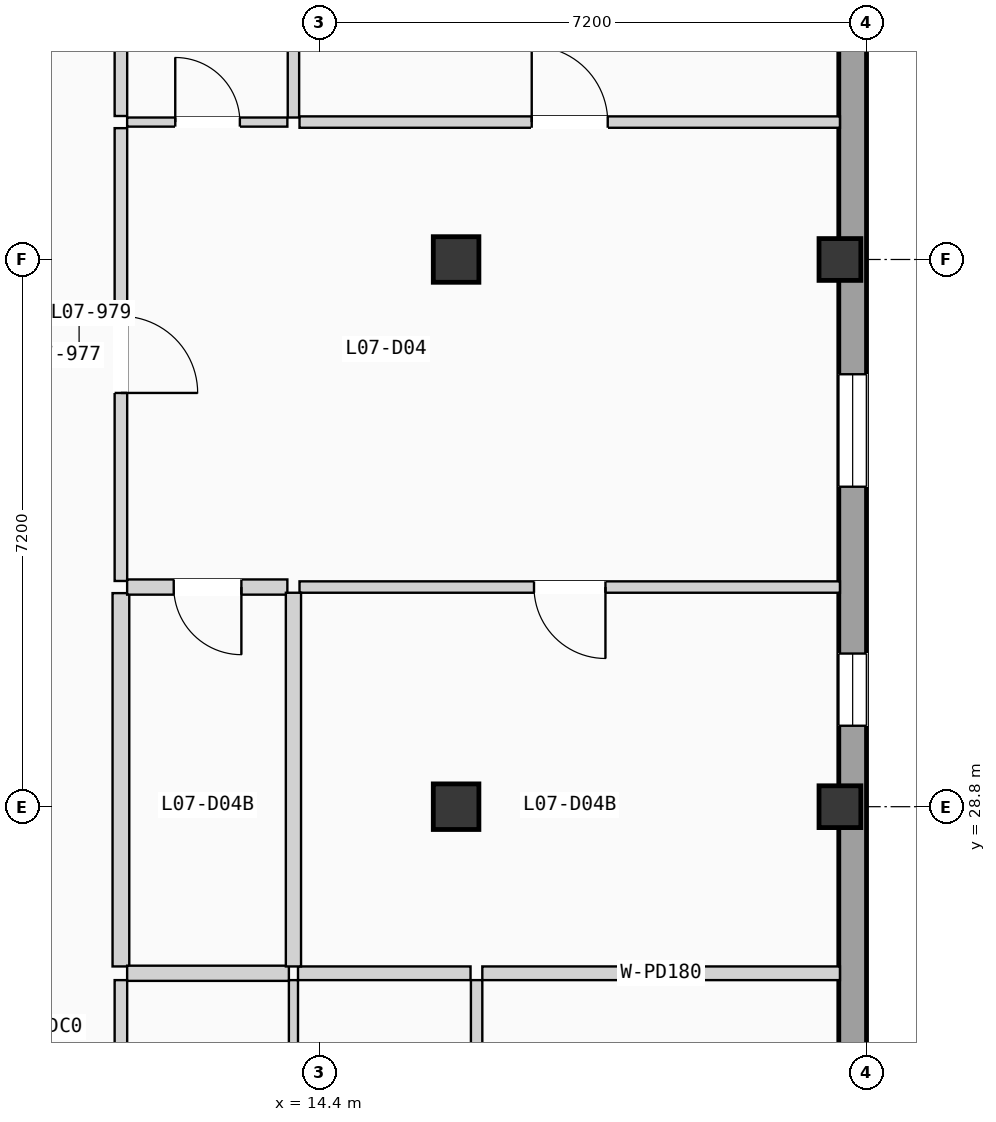
"""IFC4 building model, lengths in metres.
Left out: names, types, materials, properties, quantities, classifications, styles, units other than length and angle.
Written with IfcOpenShell. Run it as: python <this file> out.ifc"""

import sys

from ifc_helpers import new_model, si_unit, direction, frame, frame_2d, origin, origin_2d, place, context, subcontext, project, spatial, rectangle, extrude, element, fill, save


model = new_model("IFC4")
c1 = context("Model", 3, precision=1e-05, world=origin(), true_north=direction((0.0, 1.0)))
c2 = subcontext(c1, "Body", "Model", "MODEL_VIEW")
j1 = project(units=[si_unit("LENGTHUNIT", "METRE"), si_unit("PLANEANGLEUNIT", "RADIAN")], contexts=[c1])
p1 = place(None, origin())
s1 = spatial("IfcSite", under=j1, at=p1, CompositionType="ELEMENT")
p2 = place(p1, origin())
s2 = spatial("IfcBuilding", under=s1, at=p2, CompositionType="ELEMENT")
p3 = place(p2, frame((0.0, 0.0, 24.675)))
s3 = spatial("IfcBuildingStorey", under=s2, at=p3, CompositionType="ELEMENT", Elevation=24.675)
for number, where, z_axis, x_axis in (
    (1, (16.2, 28.8, 0.0), (0.0, 0.0, 1.0), (1.0, 0.0, 0.0)),
    (2, (16.2, 36.0, 0.0), (0.0, 0.0, 1.0), (1.0, 0.0, 0.0)),
):
    element("IfcColumn", number, at=place(p3, frame(where, z_axis=z_axis, x_axis=x_axis)), inside=s3, PredefinedType="COLUMN", context=c2, shape_type="SweptSolid", body=[
        extrude(rectangle(XDim=0.6, YDim=0.6, at=origin_2d()), origin(), (0.0, 0.0, 1.0), 3.15),
    ])
for number, where, z_axis, x_axis in (
    (3, (21.25, 28.8, 0.0), (0.0, 0.0, 1.0), (1.0, 0.0, 0.0)),
    (4, (21.25, 36.0, 0.0), (0.0, 0.0, 1.0), (1.0, 0.0, 0.0)),
):
    element("IfcColumn", number, at=place(p3, frame(where, z_axis=z_axis, x_axis=x_axis)), inside=s3, PredefinedType="COLUMN", context=c2, shape_type="SweptSolid", body=[
        extrude(rectangle(XDim=0.55, YDim=0.55, at=origin_2d()), origin(), (0.0, 0.0, 1.0), 3.15),
    ])
p4 = place(p3, frame((21.417, 0.365, 0.0), z_axis=(0.0, 0.0, 1.0), x_axis=(0.0, 1.0, 0.0)))
e5 = element("IfcWall", 5, at=p4, inside=s3, PredefinedType="SOLIDWALL", context=c2, shape_type="SweptSolid", body=[
    extrude(rectangle(XDim=49.67, YDim=0.365, at=frame_2d((24.835, 0.0))), origin(), (0.0, 0.0, 1.0), 2.6),
])
p5 = place(p4, frame((16.517, 0.0, 0.9)))
e6 = element("IfcOpeningElement", 6, at=p5, cuts=e5, PredefinedType="OPENING", context=c2, shape_type="SweptSolid", body=[
    extrude(rectangle(XDim=1.48, YDim=1.2, at=frame_2d((0.74, 0.6))), frame((0.0, 0.192, 0.0), z_axis=(0.0, -1.0, 0.0), x_axis=(1.0, 0.0, 0.0)), (0.0, 0.0, 1.0), 0.385),
])
p6 = place(p4, frame((9.387, 0.0, 0.815)))
e7 = element("IfcOpeningElement", 7, at=p6, cuts=e5, PredefinedType="OPENING", context=c2, shape_type="SweptSolid", body=[
    extrude(rectangle(XDim=1.48, YDim=1.35, at=frame_2d((0.74, 0.675))), frame((0.0, 0.192, 0.0), z_axis=(0.0, -1.0, 0.0), x_axis=(1.0, 0.0, 0.0)), (0.0, 0.0, 1.0), 0.385),
])
p7 = place(p4, frame((23.089, 0.0, 0.665)))
e8 = element("IfcOpeningElement", 8, at=p7, cuts=e5, PredefinedType="OPENING", context=c2, shape_type="SweptSolid", body=[
    extrude(rectangle(XDim=1.48, YDim=1.5, at=frame_2d((0.74, 0.75))), frame((0.0, 0.192, 0.0), z_axis=(0.0, -1.0, 0.0), x_axis=(1.0, 0.0, 0.0)), (0.0, 0.0, 1.0), 0.385),
])
p8 = place(p4, frame((32.645, 0.0, 0.515)))
e9 = element("IfcOpeningElement", 9, at=p8, cuts=e5, PredefinedType="OPENING", context=c2, shape_type="SweptSolid", body=[
    extrude(rectangle(XDim=1.48, YDim=1.65, at=frame_2d((0.74, 0.825))), frame((0.0, 0.192, 0.0), z_axis=(0.0, -1.0, 0.0), x_axis=(1.0, 0.0, 0.0)), (0.0, 0.0, 1.0), 0.385),
])
p9 = place(p4, frame((29.5, 0.0, 0.85)))
e10 = element("IfcOpeningElement", 10, at=p9, cuts=e5, PredefinedType="OPENING", context=c2, shape_type="SweptSolid", body=[
    extrude(rectangle(XDim=0.95, YDim=1.2, at=frame_2d((0.475, 0.6))), frame((0.0, 0.192, 0.0), z_axis=(0.0, -1.0, 0.0), x_axis=(1.0, 0.0, 0.0)), (0.0, 0.0, 1.0), 0.385),
])
p10 = place(p4, frame((39.179, 0.0, 0.9)))
e11 = element("IfcOpeningElement", 11, at=p10, cuts=e5, PredefinedType="OPENING", context=c2, shape_type="SweptSolid", body=[
    extrude(rectangle(XDim=1.6, YDim=1.2, at=frame_2d((0.8, 0.6))), frame((0.0, 0.192, 0.0), z_axis=(0.0, -1.0, 0.0), x_axis=(1.0, 0.0, 0.0)), (0.0, 0.0, 1.0), 0.385),
])
p11 = place(p3, frame((11.79, 20.733, 0.0), z_axis=(0.0, 0.0, 1.0), x_axis=(0.0, 1.0, 0.0)))
e12 = element("IfcWall", 12, at=p11, inside=s3, PredefinedType="PARTITIONING", context=c2, shape_type="SweptSolid", body=[
    extrude(rectangle(XDim=5.785, YDim=0.165, at=frame_2d((2.893, 0.0))), origin(), (0.0, 0.0, 1.0), 2.87),
])
p12 = place(p3, frame((11.79, 31.77, 0.0), z_axis=(0.0, 0.0, 1.0), x_axis=(0.0, 1.0, 0.0)))
e13 = element("IfcWall", 13, at=p12, inside=s3, PredefinedType="PARTITIONING", context=c2, shape_type="SweptSolid", body=[
    extrude(rectangle(XDim=5.958, YDim=0.165, at=frame_2d((2.979, 0.0))), origin(), (0.0, 0.0, 1.0), 2.87),
])
p13 = place(p12, frame((2.474, 0.0, 0.0)))
e14 = element("IfcOpeningElement", 14, at=p13, cuts=e13, PredefinedType="OPENING", context=c2, shape_type="SweptSolid", body=[
    extrude(rectangle(XDim=1.01, YDim=2.11, at=frame_2d((0.505, 1.055))), frame((0.0, 0.093, 0.0), z_axis=(0.0, -1.0, 0.0), x_axis=(1.0, 0.0, 0.0)), (0.0, 0.0, 1.0), 0.185),
])
p14 = place(p3, frame((11.79, 26.698, 0.0), z_axis=(0.0, 0.0, 1.0), x_axis=(0.0, 1.0, 0.0)))
e15 = element("IfcWall", 15, at=p14, inside=s3, PredefinedType="PLUMBINGWALL", context=c2, shape_type="SweptSolid", body=[
    extrude(rectangle(XDim=4.912, YDim=0.22, at=frame_2d((2.456, 0.0))), origin(), (0.0, 0.0, 1.0), 2.87),
])
p15 = place(p3, frame((11.79, 37.888, 0.0), z_axis=(0.0, 0.0, 1.0), x_axis=(0.0, 1.0, 0.0)))
e16 = element("IfcWall", 16, at=p15, inside=s3, PredefinedType="PARTITIONING", context=c2, shape_type="SweptSolid", body=[
    extrude(rectangle(XDim=4.912, YDim=0.165, at=frame_2d((2.456, 0.0))), origin(), (0.0, 0.0, 1.0), 2.87),
])
p16 = place(p3, frame((14.06, 20.713, 0.0), z_axis=(0.0, 0.0, 1.0), x_axis=(0.0, 1.0, 0.0)))
e17 = element("IfcWall", 17, at=p16, inside=s3, PredefinedType="PARTITIONING", context=c2, shape_type="SweptSolid", body=[
    extrude(rectangle(XDim=5.805, YDim=0.12, at=frame_2d((2.903, 0.0))), origin(), (0.0, 0.0, 1.0), 2.87),
])
p17 = place(p3, frame((11.872, 26.608, 0.0), z_axis=(0.0, 0.0, 1.0), x_axis=(1.0, 0.0, 0.0)))
e18 = element("IfcWall", 18, at=p17, inside=s3, PredefinedType="PLUMBINGWALL", context=c2, shape_type="SweptSolid", body=[
    extrude(rectangle(XDim=2.128, YDim=0.2, at=frame_2d((1.064, 0.0))), origin(), (0.0, 0.0, 1.0), 2.87),
])
p18 = place(p3, frame((16.47, 20.728, 0.0), z_axis=(0.0, 0.0, 1.0), x_axis=(0.0, 1.0, 0.0)))
e19 = element("IfcWall", 19, at=p18, inside=s3, PredefinedType="PARTITIONING", context=c2, shape_type="SweptSolid", body=[
    extrude(rectangle(XDim=5.79, YDim=0.15, at=frame_2d((2.895, 0.0))), origin(), (0.0, 0.0, 1.0), 2.87),
])
p19 = place(p3, frame((16.545, 26.608, 0.0), z_axis=(0.0, 0.0, 1.0), x_axis=(1.0, 0.0, 0.0)))
e20 = element("IfcWall", 20, at=p19, inside=s3, PredefinedType="PARTITIONING", context=c2, shape_type="SweptSolid", body=[
    extrude(rectangle(XDim=4.705, YDim=0.18, at=frame_2d((2.353, 0.0))), origin(), (0.0, 0.0, 1.0), 2.87),
])
p20 = place(p3, frame((14.12, 26.608, 0.0), z_axis=(0.0, 0.0, 1.0), x_axis=(1.0, 0.0, 0.0)))
e21 = element("IfcWall", 21, at=p20, inside=s3, PredefinedType="PARTITIONING", context=c2, shape_type="SweptSolid", body=[
    extrude(rectangle(XDim=2.27, YDim=0.18, at=frame_2d((1.135, 0.0))), origin(), (0.0, 0.0, 1.0), 2.87),
])
p21 = place(p3, frame((11.872, 31.69, 0.0), z_axis=(0.0, 0.0, 1.0), x_axis=(1.0, 0.0, 0.0)))
e22 = element("IfcWall", 22, at=p21, inside=s3, PredefinedType="PLUMBINGWALL", context=c2, shape_type="SweptSolid", body=[
    extrude(rectangle(XDim=2.108, YDim=0.2, at=frame_2d((1.054, 0.0))), origin(), (0.0, 0.0, 1.0), 2.87),
])
p22 = place(p21, frame((0.613, 0.0, 0.0)))
e23 = element("IfcOpeningElement", 23, at=p22, cuts=e22, PredefinedType="OPENING", context=c2, shape_type="SweptSolid", body=[
    extrude(rectangle(XDim=0.89, YDim=2.03, at=frame_2d((0.445, 1.015))), frame((0.0, 0.11, 0.0), z_axis=(0.0, -1.0, 0.0), x_axis=(1.0, 0.0, 0.0)), (0.0, 0.0, 1.0), 0.22),
])
p23 = place(p3, frame((11.872, 37.808, 0.0), z_axis=(0.0, 0.0, 1.0), x_axis=(1.0, 0.0, 0.0)))
e24 = element("IfcWall", 24, at=p23, inside=s3, PredefinedType="PARTITIONING", context=c2, shape_type="SweptSolid", body=[
    extrude(rectangle(XDim=2.108, YDim=0.12, at=frame_2d((1.054, 0.0))), origin(), (0.0, 0.0, 1.0), 2.87),
])
p24 = place(p23, frame((0.633, 0.0, 0.0)))
e25 = element("IfcOpeningElement", 25, at=p24, cuts=e24, PredefinedType="OPENING", context=c2, shape_type="SweptSolid", body=[
    extrude(rectangle(XDim=0.85, YDim=2.01, at=frame_2d((0.425, 1.005))), frame((0.0, 0.07, 0.0), z_axis=(0.0, -1.0, 0.0), x_axis=(1.0, 0.0, 0.0)), (0.0, 0.0, 1.0), 0.14),
])
p25 = place(p3, frame((14.14, 31.69, 0.0), z_axis=(0.0, 0.0, 1.0), x_axis=(1.0, 0.0, 0.0)))
e26 = element("IfcWall", 26, at=p25, inside=s3, PredefinedType="PARTITIONING", context=c2, shape_type="SweptSolid", body=[
    extrude(rectangle(XDim=7.11, YDim=0.15, at=frame_2d((3.555, 0.0))), origin(), (0.0, 0.0, 1.0), 2.87),
])
p26 = place(p25, frame((3.085, 0.0, 0.0)))
e27 = element("IfcOpeningElement", 27, at=p26, cuts=e26, PredefinedType="OPENING", context=c2, shape_type="SweptSolid", body=[
    extrude(rectangle(XDim=0.94, YDim=2.06, at=frame_2d((0.47, 1.03))), frame((0.0, 0.085, 0.0), z_axis=(0.0, -1.0, 0.0), x_axis=(1.0, 0.0, 0.0)), (0.0, 0.0, 1.0), 0.17),
])
p27 = place(p3, frame((14.14, 37.808, 0.0), z_axis=(0.0, 0.0, 1.0), x_axis=(1.0, 0.0, 0.0)))
e28 = element("IfcWall", 28, at=p27, inside=s3, PredefinedType="PARTITIONING", context=c2, shape_type="SweptSolid", body=[
    extrude(rectangle(XDim=7.11, YDim=0.15, at=frame_2d((3.555, 0.0))), origin(), (0.0, 0.0, 1.0), 2.87),
])
p28 = place(p27, frame((3.055, 0.0, 0.0)))
e29 = element("IfcOpeningElement", 29, at=p28, cuts=e28, PredefinedType="OPENING", context=c2, shape_type="SweptSolid", body=[
    extrude(rectangle(XDim=1.0, YDim=2.06, at=frame_2d((0.5, 1.03))), frame((0.0, 0.085, 0.0), z_axis=(0.0, -1.0, 0.0), x_axis=(1.0, 0.0, 0.0)), (0.0, 0.0, 1.0), 0.17),
])
p29 = place(p3, frame((14.06, 26.698, 0.0), z_axis=(0.0, 0.0, 1.0), x_axis=(0.0, 1.0, 0.0)))
e30 = element("IfcWall", 30, at=p29, inside=s3, PredefinedType="PLUMBINGWALL", context=c2, shape_type="SweptSolid", body=[
    extrude(rectangle(XDim=4.917, YDim=0.2, at=frame_2d((2.458, 0.0))), origin(), (0.0, 0.0, 1.0), 2.87),
])
p30 = place(p3, frame((14.06, 37.868, 0.0), z_axis=(0.0, 0.0, 1.0), x_axis=(0.0, 1.0, 0.0)))
e31 = element("IfcWall", 31, at=p30, inside=s3, PredefinedType="PARTITIONING", context=c2, shape_type="SweptSolid", body=[
    extrude(rectangle(XDim=4.932, YDim=0.15, at=frame_2d((2.466, 0.0))), origin(), (0.0, 0.0, 1.0), 2.87),
])
p31 = place(p8, origin())
e32 = element("IfcWindow", 32, at=p31, inside=s3, PartitioningType="SINGLE_PANEL", PredefinedType="WINDOW", context=c2, shape_type="SweptSolid", body=[
    extrude(rectangle(XDim=1.48, YDim=1.65, at=frame_2d((0.74, 0.825))), frame((0.0, 0.03, 0.0), z_axis=(0.0, -1.0, 0.0), x_axis=(1.0, 0.0, 0.0)), (0.0, 0.0, 1.0), 0.06),
])
fill(e9, e32)
p32 = place(p9, origin())
e33 = element("IfcWindow", 33, at=p32, inside=s3, PartitioningType="SINGLE_PANEL", PredefinedType="WINDOW", context=c2, shape_type="SweptSolid", body=[
    extrude(rectangle(XDim=0.95, YDim=1.2, at=frame_2d((0.475, 0.6))), frame((0.0, 0.03, 0.0), z_axis=(0.0, -1.0, 0.0), x_axis=(1.0, 0.0, 0.0)), (0.0, 0.0, 1.0), 0.06),
])
fill(e10, e33)
p33 = place(p13, frame((1.01, 0.0, 0.0), z_axis=(0.0, 0.0, 1.0), x_axis=(-1.0, 0.0, 0.0)))
e34 = element("IfcDoor", 34, at=p33, inside=s3, OperationType="SINGLE_SWING_LEFT", PredefinedType="DOOR", context=c2, shape_type="SweptSolid", body=[
    extrude(rectangle(XDim=1.01, YDim=2.11, at=frame_2d((0.505, 1.055))), frame((0.0, 0.025, 0.0), z_axis=(0.0, -1.0, 0.0), x_axis=(1.0, 0.0, 0.0)), (0.0, 0.0, 1.0), 0.05),
])
fill(e14, e34)
p34 = place(p22, frame((0.89, 0.0, 0.0), z_axis=(0.0, 0.0, 1.0), x_axis=(-1.0, 0.0, 0.0)))
e35 = element("IfcDoor", 35, at=p34, inside=s3, OperationType="SINGLE_SWING_RIGHT", PredefinedType="DOOR", context=c2, shape_type="SweptSolid", body=[
    extrude(rectangle(XDim=0.89, YDim=2.03, at=frame_2d((0.445, 1.015))), frame((0.0, 0.025, 0.0), z_axis=(0.0, -1.0, 0.0), x_axis=(1.0, 0.0, 0.0)), (0.0, 0.0, 1.0), 0.05),
])
fill(e23, e35)
p35 = place(p24, origin())
e36 = element("IfcDoor", 36, at=p35, inside=s3, OperationType="SINGLE_SWING_LEFT", PredefinedType="DOOR", context=c2, shape_type="SweptSolid", body=[
    extrude(rectangle(XDim=0.85, YDim=2.01, at=frame_2d((0.425, 1.005))), frame((0.0, 0.025, 0.0), z_axis=(0.0, -1.0, 0.0), x_axis=(1.0, 0.0, 0.0)), (0.0, 0.0, 1.0), 0.05),
])
fill(e25, e36)
p36 = place(p26, frame((0.94, 0.0, 0.0), z_axis=(0.0, 0.0, 1.0), x_axis=(-1.0, 0.0, 0.0)))
e37 = element("IfcDoor", 37, at=p36, inside=s3, OperationType="SINGLE_SWING_RIGHT", PredefinedType="DOOR", context=c2, shape_type="SweptSolid", body=[
    extrude(rectangle(XDim=0.94, YDim=2.06, at=frame_2d((0.47, 1.03))), frame((0.0, 0.025, 0.0), z_axis=(0.0, -1.0, 0.0), x_axis=(1.0, 0.0, 0.0)), (0.0, 0.0, 1.0), 0.05),
])
fill(e27, e37)
p37 = place(p28, origin())
e38 = element("IfcDoor", 38, at=p37, inside=s3, OperationType="SINGLE_SWING_LEFT", PredefinedType="DOOR", context=c2, shape_type="SweptSolid", body=[
    extrude(rectangle(XDim=1.0, YDim=2.06, at=frame_2d((0.5, 1.03))), frame((0.0, 0.025, 0.0), z_axis=(0.0, -1.0, 0.0), x_axis=(1.0, 0.0, 0.0)), (0.0, 0.0, 1.0), 0.05),
])
fill(e29, e38)
save(model, sys.argv[1])
